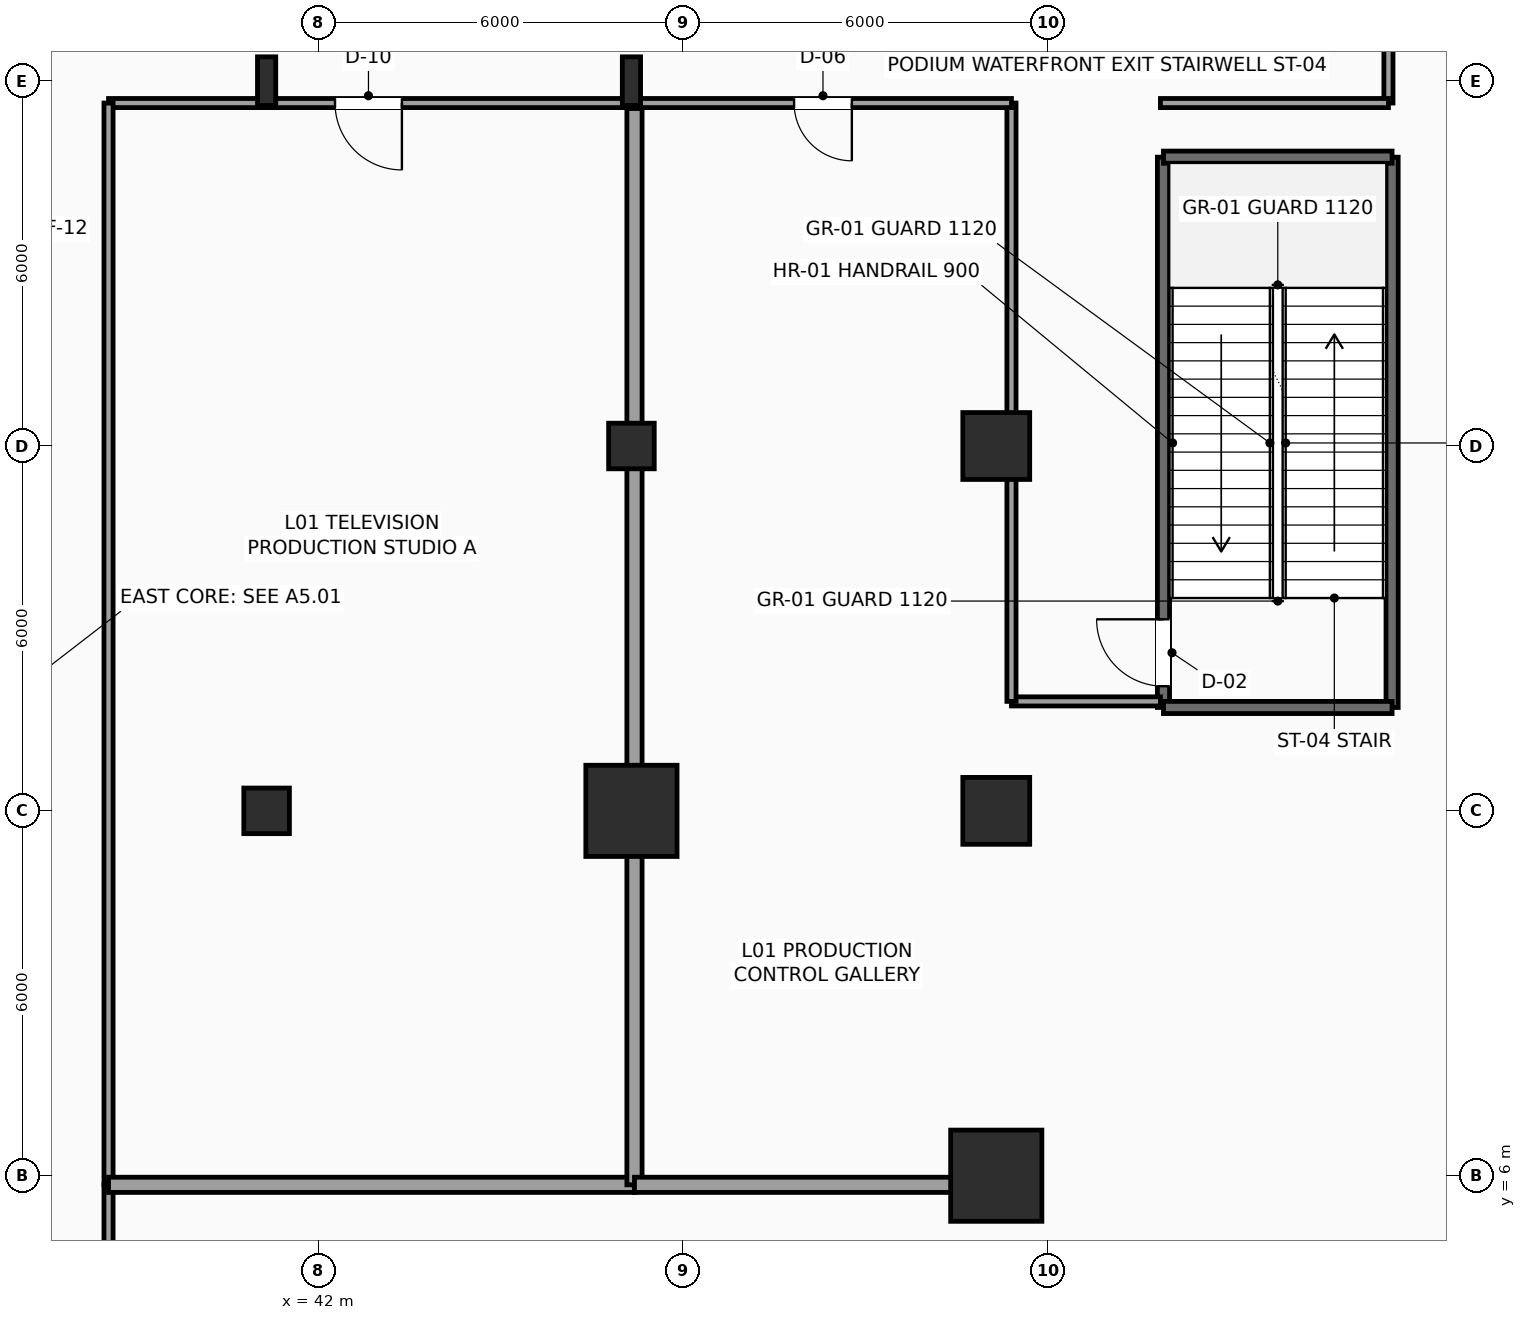
"""IFC4 building model, lengths in metres.
Left out: names, types, materials, properties, quantities, classifications, styles, units other than length and angle.
Written with IfcOpenShell. Run it as: python <this file> out.ifc"""

import sys

from ifc_helpers import new_model, si_unit, direction, frame, frame_2d, origin, origin_2d, place, context, subcontext, project, spatial, rectangle, hollow_rectangle, i_section, extrude, element, fill, save


model = new_model("IFC4")
c1 = context("Model", 3, precision=1e-05, world=origin(), true_north=direction((0.0, 1.0)))
c2 = subcontext(c1, "Body", "Model", "MODEL_VIEW")
j1 = project(units=[si_unit("LENGTHUNIT", "METRE"), si_unit("PLANEANGLEUNIT", "RADIAN")], contexts=[c1])
p1 = place(None, origin())
s1 = spatial("IfcSite", under=j1, at=p1, CompositionType="ELEMENT")
p2 = place(p1, origin())
s2 = spatial("IfcBuilding", under=s1, at=p2, CompositionType="ELEMENT")
p3 = place(p2, frame((0.0, 0.0, 5.7)))
s3 = spatial("IfcBuildingStorey", under=s2, at=p3, CompositionType="ELEMENT", Elevation=5.7)
p4 = place(p3, frame((41.15, 12.0, 0.0), z_axis=(0.0, 0.0, 1.0), x_axis=(1.0, 0.0, 0.0)))
e1 = element("IfcColumn", 1, at=p4, inside=s3, PredefinedType="COLUMN", context=c2, shape_type="SweptSolid", body=[
    extrude(hollow_rectangle(XDim=0.75, YDim=0.75, WallThickness=0.035, InnerFilletRadius=0.035, OuterFilletRadius=0.05, at=origin_2d()), origin(), (0.0, 0.0, 1.0), 5.4),
])
p5 = place(p3, frame((41.15, 24.0, 0.0), z_axis=(0.0, 0.0, 1.0), x_axis=(1.0, 0.0, 0.0)))
e2 = element("IfcColumn", 2, at=p5, inside=s3, PredefinedType="COLUMN", context=c2, shape_type="SweptSolid", body=[
    extrude(i_section(OverallWidth=0.3, OverallDepth=0.8, WebThickness=0.018, FlangeThickness=0.033, FilletRadius=0.03, at=origin_2d()), origin(), (0.0, 0.0, 1.0), 5.4),
])
p6 = place(p3, frame((47.15, 12.0, 0.0), z_axis=(0.0, 0.0, 1.0), x_axis=(1.0, 0.0, 0.0)))
e3 = element("IfcColumn", 3, at=p6, inside=s3, PredefinedType="COLUMN", context=c2, shape_type="SweptSolid", body=[
    extrude(rectangle(XDim=1.5, YDim=1.5, at=origin_2d()), origin(), (0.0, 0.0, 1.0), 5.4),
])
p7 = place(p3, frame((47.15, 18.0, 0.0), z_axis=(0.0, 0.0, 1.0), x_axis=(1.0, 0.0, 0.0)))
e4 = element("IfcColumn", 4, at=p7, inside=s3, PredefinedType="COLUMN", context=c2, shape_type="SweptSolid", body=[
    extrude(hollow_rectangle(XDim=0.75, YDim=0.75, WallThickness=0.035, InnerFilletRadius=0.035, OuterFilletRadius=0.05, at=origin_2d()), origin(), (0.0, 0.0, 1.0), 5.4),
])
p8 = place(p3, frame((47.15, 24.0, 0.0), z_axis=(0.0, 0.0, 1.0), x_axis=(1.0, 0.0, 0.0)))
e5 = element("IfcColumn", 5, at=p8, inside=s3, PredefinedType="COLUMN", context=c2, shape_type="SweptSolid", body=[
    extrude(i_section(OverallWidth=0.3, OverallDepth=0.8, WebThickness=0.018, FlangeThickness=0.033, FilletRadius=0.03, at=origin_2d()), origin(), (0.0, 0.0, 1.0), 5.4),
])
p9 = place(p3, frame((53.15, 6.0, 0.0), z_axis=(0.0, 0.0, 1.0), x_axis=(1.0, 0.0, 0.0)))
e6 = element("IfcColumn", 6, at=p9, inside=s3, PredefinedType="COLUMN", context=c2, shape_type="SweptSolid", body=[
    extrude(rectangle(XDim=1.5, YDim=1.5, at=origin_2d()), origin(), (0.0, 0.0, 1.0), 5.4),
])
for number, where, z_axis, x_axis in (
    (7, (53.15, 12.0, 0.0), (0.0, 0.0, 1.0), (1.0, 0.0, 0.0)),
    (8, (53.15, 18.0, 0.0), (0.0, 0.0, 1.0), (1.0, 0.0, 0.0)),
):
    element("IfcColumn", number, at=place(p3, frame(where, z_axis=z_axis, x_axis=x_axis)), inside=s3, PredefinedType="COLUMN", context=c2, shape_type="SweptSolid", body=[
        extrude(rectangle(XDim=1.1, YDim=1.1, at=origin_2d()), origin(), (0.0, 0.0, 1.0), 5.4),
    ])
p10 = place(p3, frame((55.9, 13.7, 0.0), z_axis=(0.0, 0.0, 1.0), x_axis=(0.0, 1.0, 0.0)))
e9 = element("IfcWall", 9, at=p10, inside=s3, PredefinedType="SHEAR", context=c2, shape_type="SweptSolid", body=[
    extrude(rectangle(XDim=9.05, YDim=0.2, at=frame_2d((4.525, 0.0))), origin(), (0.0, 0.0, 1.0), 5.125),
])
p11 = place(p10, frame((0.35, 0.0, 0.0)))
e10 = element("IfcOpeningElement", 10, at=p11, cuts=e9, PredefinedType="OPENING", context=c2, shape_type="SweptSolid", body=[
    extrude(rectangle(XDim=1.1, YDim=2.2, at=frame_2d((0.55, 1.1))), frame((0.0, 0.11, 0.0), z_axis=(0.0, -1.0, 0.0), x_axis=(1.0, 0.0, 0.0)), (0.0, 0.0, 1.0), 0.22),
])
p12 = place(p3, frame((59.66, 13.7, 0.0), z_axis=(0.0, 0.0, 1.0), x_axis=(0.0, 1.0, 0.0)))
e11 = element("IfcWall", 11, at=p12, inside=s3, PredefinedType="SHEAR", context=c2, shape_type="SweptSolid", body=[
    extrude(rectangle(XDim=9.05, YDim=0.2, at=frame_2d((4.525, 0.0))), origin(), (0.0, 0.0, 1.0), 5.125),
])
for number, where, z_axis, x_axis in (
    (12, (55.9, 13.7, 0.0), (0.0, 0.0, 1.0), (1.0, 0.0, 0.0)),
    (13, (55.9, 22.75, 0.0), (0.0, 0.0, 1.0), (1.0, 0.0, 0.0)),
):
    element("IfcWall", number, at=place(p3, frame(where, z_axis=z_axis, x_axis=x_axis)), inside=s3, PredefinedType="SHEAR", context=c2, shape_type="SweptSolid", body=[
        extrude(rectangle(XDim=3.76, YDim=0.2, at=frame_2d((1.88, 0.0))), origin(), (0.0, 0.0, 1.0), 5.125),
    ])
p13 = place(p3, frame((59.6, 26.2, 0.0), z_axis=(0.0, 0.0, 1.0), x_axis=(0.0, -1.0, 0.0)))
e14 = element("IfcWall", 14, at=p13, inside=s3, PredefinedType="PARTITIONING", context=c2, shape_type="SweptSolid", body=[
    extrude(rectangle(XDim=2.56, YDim=0.15, at=frame_2d((1.28, 0.0))), origin(), (0.0, 0.0, 1.0), 5.125),
])
p14 = place(p3, frame((59.6, 23.64, 0.0), z_axis=(0.0, 0.0, 1.0), x_axis=(-1.0, 0.0, 0.0)))
e15 = element("IfcWall", 15, at=p14, inside=s3, PredefinedType="PARTITIONING", context=c2, shape_type="SweptSolid", body=[
    extrude(rectangle(XDim=3.75, YDim=0.15, at=frame_2d((1.875, 0.0))), origin(), (0.0, 0.0, 1.0), 5.125),
])
p15 = place(p3, frame((55.85, 13.8, 0.0), z_axis=(0.0, 0.0, 1.0), x_axis=(-1.0, 0.0, 0.0)))
e16 = element("IfcWall", 16, at=p15, inside=s3, PredefinedType="PARTITIONING", context=c2, shape_type="SweptSolid", body=[
    extrude(rectangle(XDim=2.45, YDim=0.15, at=frame_2d((1.225, 0.0))), origin(), (0.0, 0.0, 1.0), 5.125),
])
p16 = place(p3, frame((53.4, 13.8, 0.0), z_axis=(0.0, 0.0, 1.0), x_axis=(0.0, 1.0, 0.0)))
e17 = element("IfcWall", 17, at=p16, inside=s3, PredefinedType="PARTITIONING", context=c2, shape_type="SweptSolid", body=[
    extrude(rectangle(XDim=9.84, YDim=0.15, at=frame_2d((4.92, 0.0))), origin(), (0.0, 0.0, 1.0), 5.125),
])
p17 = place(p3, frame((53.4, 23.64, 0.0), z_axis=(0.0, 0.0, 1.0), x_axis=(-1.0, 0.0, 0.0)))
e18 = element("IfcWall", 18, at=p17, inside=s3, PredefinedType="PARTITIONING", context=c2, shape_type="SweptSolid", body=[
    extrude(rectangle(XDim=14.85, YDim=0.15, at=frame_2d((7.425, 0.0))), origin(), (0.0, 0.0, 1.0), 5.125),
])
p18 = place(p17, frame((10.025, 0.0, 0.0)))
e19 = element("IfcOpeningElement", 19, at=p18, cuts=e18, PredefinedType="OPENING", context=c2, shape_type="SweptSolid", body=[
    extrude(rectangle(XDim=1.1, YDim=2.25, at=frame_2d((0.55, 1.125))), frame((0.0, 0.085, 0.0), z_axis=(0.0, -1.0, 0.0), x_axis=(1.0, 0.0, 0.0)), (0.0, 0.0, 1.0), 0.17),
])
p19 = place(p17, frame((2.625, 0.0, 0.0)))
e20 = element("IfcOpeningElement", 20, at=p19, cuts=e18, PredefinedType="OPENING", context=c2, shape_type="SweptSolid", body=[
    extrude(rectangle(XDim=0.95, YDim=2.15, at=frame_2d((0.475, 1.075))), frame((0.0, 0.085, 0.0), z_axis=(0.0, -1.0, 0.0), x_axis=(1.0, 0.0, 0.0)), (0.0, 0.0, 1.0), 0.17),
])
p20 = place(p3, frame((38.55, 23.64, 0.0), z_axis=(0.0, 0.0, 1.0), x_axis=(0.0, -1.0, 0.0)))
e21 = element("IfcWall", 21, at=p20, inside=s3, PredefinedType="PARTITIONING", context=c2, shape_type="SweptSolid", body=[
    extrude(rectangle(XDim=17.79, YDim=0.15, at=frame_2d((8.895, 0.0))), origin(), (0.0, 0.0, 1.0), 5.125),
])
p21 = place(p3, frame((38.55, 5.85, 0.0), z_axis=(0.0, 0.0, 1.0), x_axis=(0.0, -1.0, 0.0)))
e22 = element("IfcWall", 22, at=p21, inside=s3, PredefinedType="PARTITIONING", context=c2, shape_type="SweptSolid", body=[
    extrude(rectangle(XDim=2.4, YDim=0.15, at=frame_2d((1.2, 0.0))), origin(), (0.0, 0.0, 1.0), 5.125),
])
p22 = place(p3, frame((38.55, 5.85, 0.0), z_axis=(0.0, 0.0, 1.0), x_axis=(1.0, 0.0, 0.0)))
e23 = element("IfcWall", 23, at=p22, inside=s3, PredefinedType="PARTITIONING", context=c2, shape_type="SweptSolid", body=[
    extrude(rectangle(XDim=8.65, YDim=0.25, at=frame_2d((4.325, 0.0))), origin(), (0.0, 0.0, 1.0), 5.125),
])
p23 = place(p3, frame((47.2, 5.85, 0.0), z_axis=(0.0, 0.0, 1.0), x_axis=(0.0, 1.0, 0.0)))
e24 = element("IfcWall", 24, at=p23, inside=s3, PredefinedType="PARTITIONING", context=c2, shape_type="SweptSolid", body=[
    extrude(rectangle(XDim=17.7, YDim=0.25, at=frame_2d((8.85, 0.0))), origin(), (0.0, 0.0, 1.0), 4.217),
])
p24 = place(p3, frame((47.2, 5.85, 0.0), z_axis=(0.0, 0.0, 1.0), x_axis=(1.0, 0.0, 0.0)))
e25 = element("IfcWall", 25, at=p24, inside=s3, PredefinedType="PARTITIONING", context=c2, shape_type="SweptSolid", body=[
    extrude(rectangle(XDim=6.2, YDim=0.25, at=frame_2d((3.1, 0.0))), origin(), (0.0, 0.0, 1.0), 5.125),
])
p25 = place(p11, origin())
e26 = element("IfcDoor", 26, at=p25, inside=s3, OperationType="SINGLE_SWING_RIGHT", PredefinedType="DOOR", context=c2, shape_type="SweptSolid", body=[
    extrude(rectangle(XDim=1.1, YDim=2.2, at=frame_2d((0.55, 1.1))), frame((0.0, 0.025, 0.0), z_axis=(0.0, -1.0, 0.0), x_axis=(1.0, 0.0, 0.0)), (0.0, 0.0, 1.0), 0.05),
])
fill(e10, e26)
p26 = place(p18, origin())
e27 = element("IfcDoor", 27, at=p26, inside=s3, OperationType="SINGLE_SWING_LEFT", PredefinedType="DOOR", context=c2, shape_type="SweptSolid", body=[
    extrude(rectangle(XDim=1.1, YDim=2.25, at=frame_2d((0.55, 1.125))), frame((0.0, 0.025, 0.0), z_axis=(0.0, -1.0, 0.0), x_axis=(1.0, 0.0, 0.0)), (0.0, 0.0, 1.0), 0.05),
])
fill(e19, e27)
p27 = place(p19, origin())
e28 = element("IfcDoor", 28, at=p27, inside=s3, OperationType="SINGLE_SWING_LEFT", PredefinedType="DOOR", context=c2, shape_type="SweptSolid", body=[
    extrude(rectangle(XDim=0.95, YDim=2.15, at=frame_2d((0.475, 1.075))), frame((0.0, 0.025, 0.0), z_axis=(0.0, -1.0, 0.0), x_axis=(1.0, 0.0, 0.0)), (0.0, 0.0, 1.0), 0.05),
])
fill(e20, e28)
save(model, sys.argv[1])
